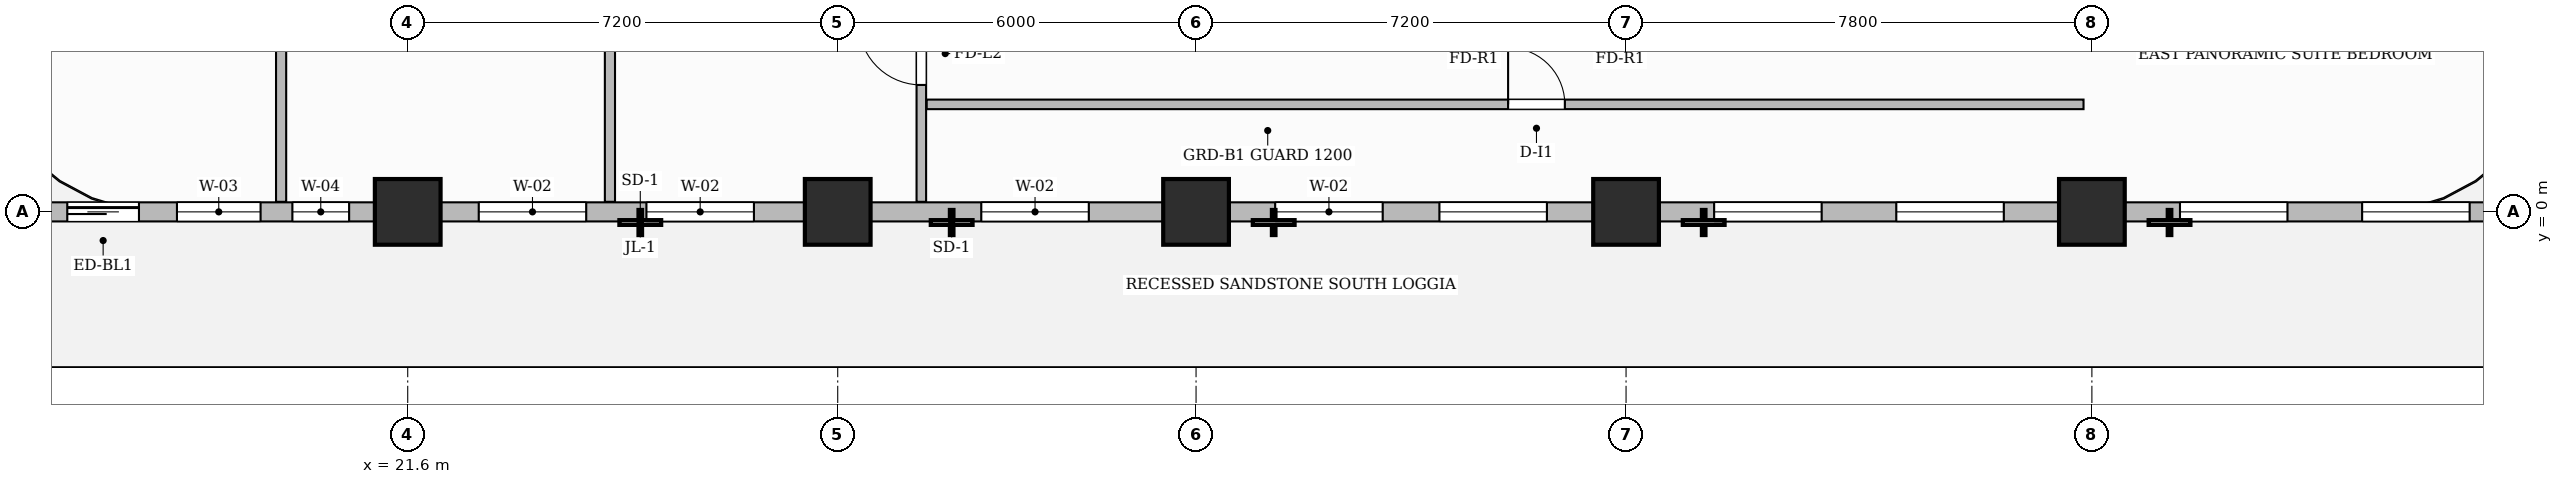
"""IFC4 building model, lengths in metres.
Left out: names, types, materials, properties, quantities, classifications, styles, units other than length and angle.
Written with IfcOpenShell. Run it as: python <this file> out.ifc"""

import sys

from ifc_helpers import new_model, si_unit, direction, frame, frame_2d, origin, origin_2d, place, context, subcontext, project, spatial, rectangle, extrude, source, transform, mapped, element, fill, save


model = new_model("IFC4")
c1 = context("Model", 3, precision=1e-05, world=origin(), true_north=direction((0.0, 1.0)))
c2 = subcontext(c1, "Body", "Model", "MODEL_VIEW")
j1 = project(units=[si_unit("LENGTHUNIT", "METRE"), si_unit("PLANEANGLEUNIT", "RADIAN")], contexts=[c1])
p1 = place(None, origin())
s1 = spatial("IfcSite", under=j1, at=p1, CompositionType="ELEMENT")
p2 = place(p1, origin())
s2 = spatial("IfcBuilding", under=s1, at=p2, CompositionType="ELEMENT")
p3 = place(p2, frame((0.0, 0.0, 32.4)))
s3 = spatial("IfcBuildingStorey", under=s2, at=p3, CompositionType="ELEMENT", Elevation=32.4)
m1 = source(origin(), c2, "Body", "SweptSolid", [
    extrude(rectangle(XDim=1.1, YDim=1.1, at=origin_2d()), origin(), (0.0, 0.0, 1.0), 3.7),
])
for number, where, z_axis, x_axis in (
    (1, (21.6, 0.0, 0.0), (0.0, 0.0, 1.0), (1.0, 0.0, 0.0)),
    (2, (28.8, 0.0, 0.0), (0.0, 0.0, 1.0), (1.0, 0.0, 0.0)),
    (3, (34.8, 0.0, 0.0), (0.0, 0.0, 1.0), (1.0, 0.0, 0.0)),
    (4, (42.0, 0.0, 0.0), (0.0, 0.0, 1.0), (1.0, 0.0, 0.0)),
    (5, (49.8, 0.0, 0.0), (0.0, 0.0, 1.0), (1.0, 0.0, 0.0)),
):
    element("IfcColumn", number, at=place(p3, frame(where, z_axis=z_axis, x_axis=x_axis)), inside=s3, PredefinedType="COLUMN", context=c2, shape_type="MappedRepresentation", body=[
        mapped(m1, transform((0.0, 0.0, 0.0), scale=1.0)),
    ])
p4 = place(p3, frame((30.2, 0.168, 0.0), z_axis=(0.0, 0.0, 1.0), x_axis=(0.0, 1.0, 0.0)))
e6 = element("IfcWall", 6, at=p4, inside=s3, PredefinedType="PARTITIONING", context=c2, shape_type="SweptSolid", body=[
    extrude(rectangle(XDim=8.892, YDim=0.16, at=frame_2d((4.446, 0.0))), origin(), (0.0, 0.0, 1.0), 3.45),
])
p5 = place(p4, frame((1.957, 0.0, 0.0)))
e7 = element("IfcOpeningElement", 7, at=p5, cuts=e6, PredefinedType="OPENING", context=c2, shape_type="SweptSolid", body=[
    extrude(rectangle(XDim=1.05, YDim=2.15, at=frame_2d((0.525, 1.075))), frame((0.0, 0.09, 0.0), z_axis=(0.0, -1.0, 0.0), x_axis=(1.0, 0.0, 0.0)), (0.0, 0.0, 1.0), 0.18),
])
p6 = place(p3, frame((30.29, 1.8, 0.0), z_axis=(0.0, 0.0, 1.0), x_axis=(1.0, 0.0, 0.0)))
e8 = element("IfcWall", 8, at=p6, inside=s3, PredefinedType="PARTITIONING", context=c2, shape_type="SweptSolid", body=[
    extrude(rectangle(XDim=19.37, YDim=0.16, at=frame_2d((9.685, 0.0))), origin(), (0.0, 0.0, 1.0), 3.45),
])
p7 = place(p6, frame((9.735, 0.0, 0.0)))
e9 = element("IfcOpeningElement", 9, at=p7, cuts=e8, PredefinedType="OPENING", context=c2, shape_type="SweptSolid", body=[
    extrude(rectangle(XDim=0.95, YDim=2.15, at=frame_2d((0.475, 1.075))), frame((0.0, 0.09, 0.0), z_axis=(0.0, -1.0, 0.0), x_axis=(1.0, 0.0, 0.0)), (0.0, 0.0, 1.0), 0.18),
])
p8 = place(p3, frame((19.48, 0.168, 0.0), z_axis=(0.0, 0.0, 1.0), x_axis=(0.0, 1.0, 0.0)))
e10 = element("IfcWall", 10, at=p8, inside=s3, PredefinedType="PARTITIONING", context=c2, shape_type="SweptSolid", body=[
    extrude(rectangle(XDim=8.892, YDim=0.17, at=frame_2d((4.446, 0.0))), origin(), (0.0, 0.0, 1.0), 3.45),
])
p9 = place(p3, frame((24.986, 0.168, 0.0), z_axis=(0.0, 0.0, 1.0), x_axis=(0.0, 1.0, 0.0)))
e11 = element("IfcWall", 11, at=p9, inside=s3, PredefinedType="PARTITIONING", context=c2, shape_type="SweptSolid", body=[
    extrude(rectangle(XDim=8.892, YDim=0.17, at=frame_2d((4.446, 0.0))), origin(), (0.0, 0.0, 1.0), 3.035),
])
p10 = place(p3, frame((14.4, 0.0, 0.0), z_axis=(0.0, 0.0, 1.0), x_axis=(1.0, 0.0, 0.0)))
e12 = element("IfcWall", 12, at=p10, inside=s3, PredefinedType="SOLIDWALL", context=c2, shape_type="SweptSolid", body=[
    extrude(rectangle(XDim=43.2, YDim=0.32, at=frame_2d((21.6, 0.0))), origin(), (0.0, 0.0, 1.0), 2.885),
])
p11 = place(p10, frame((1.5, 0.0, 0.0)))
e13 = element("IfcOpeningElement", 13, at=p11, cuts=e12, PredefinedType="OPENING", context=c2, shape_type="SweptSolid", body=[
    extrude(rectangle(XDim=1.2, YDim=2.2, at=frame_2d((0.6, 1.1))), frame((0.0, 0.17, 0.0), z_axis=(0.0, -1.0, 0.0), x_axis=(1.0, 0.0, 0.0)), (0.0, 0.0, 1.0), 0.34),
])
p12 = place(p10, frame((3.336, 0.0, 0.8)))
e14 = element("IfcOpeningElement", 14, at=p12, cuts=e12, PredefinedType="OPENING", context=c2, shape_type="SweptSolid", body=[
    extrude(rectangle(XDim=1.4, YDim=1.85, at=frame_2d((0.7, 0.925))), frame((0.0, 0.17, 0.0), z_axis=(0.0, -1.0, 0.0), x_axis=(1.0, 0.0, 0.0)), (0.0, 0.0, 1.0), 0.34),
])
p13 = place(p10, frame((5.269, 0.0, 0.8)))
e15 = element("IfcOpeningElement", 15, at=p13, cuts=e12, PredefinedType="OPENING", context=c2, shape_type="SweptSolid", body=[
    extrude(rectangle(XDim=0.95, YDim=1.75, at=frame_2d((0.475, 0.875))), frame((0.0, 0.17, 0.0), z_axis=(0.0, -1.0, 0.0), x_axis=(1.0, 0.0, 0.0)), (0.0, 0.0, 1.0), 0.34),
])
p14 = place(p10, frame((8.389, 0.0, 0.8)))
e16 = element("IfcOpeningElement", 16, at=p14, cuts=e12, PredefinedType="OPENING", context=c2, shape_type="SweptSolid", body=[
    extrude(rectangle(XDim=1.8, YDim=1.85, at=frame_2d((0.9, 0.925))), frame((0.0, 0.17, 0.0), z_axis=(0.0, -1.0, 0.0), x_axis=(1.0, 0.0, 0.0)), (0.0, 0.0, 1.0), 0.34),
])
p15 = place(p10, frame((11.197, 0.0, 0.8)))
e17 = element("IfcOpeningElement", 17, at=p15, cuts=e12, PredefinedType="OPENING", context=c2, shape_type="SweptSolid", body=[
    extrude(rectangle(XDim=1.8, YDim=1.85, at=frame_2d((0.9, 0.925))), frame((0.0, 0.17, 0.0), z_axis=(0.0, -1.0, 0.0), x_axis=(1.0, 0.0, 0.0)), (0.0, 0.0, 1.0), 0.34),
])
p16 = place(p10, frame((16.804, 0.0, 0.8)))
e18 = element("IfcOpeningElement", 18, at=p16, cuts=e12, PredefinedType="OPENING", context=c2, shape_type="SweptSolid", body=[
    extrude(rectangle(XDim=1.8, YDim=1.85, at=frame_2d((0.9, 0.925))), frame((0.0, 0.17, 0.0), z_axis=(0.0, -1.0, 0.0), x_axis=(1.0, 0.0, 0.0)), (0.0, 0.0, 1.0), 0.34),
])
p17 = place(p10, frame((21.725, 0.0, 0.8)))
e19 = element("IfcOpeningElement", 19, at=p17, cuts=e12, PredefinedType="OPENING", context=c2, shape_type="SweptSolid", body=[
    extrude(rectangle(XDim=1.8, YDim=1.85, at=frame_2d((0.9, 0.925))), frame((0.0, 0.17, 0.0), z_axis=(0.0, -1.0, 0.0), x_axis=(1.0, 0.0, 0.0)), (0.0, 0.0, 1.0), 0.34),
])
p18 = place(p10, frame((24.475, 0.0, 0.8)))
e20 = element("IfcOpeningElement", 20, at=p18, cuts=e12, PredefinedType="OPENING", context=c2, shape_type="SweptSolid", body=[
    extrude(rectangle(XDim=1.8, YDim=1.85, at=frame_2d((0.9, 0.925))), frame((0.0, 0.17, 0.0), z_axis=(0.0, -1.0, 0.0), x_axis=(1.0, 0.0, 0.0)), (0.0, 0.0, 1.0), 0.34),
])
p19 = place(p10, frame((29.075, 0.0, 0.8)))
e21 = element("IfcOpeningElement", 21, at=p19, cuts=e12, PredefinedType="OPENING", context=c2, shape_type="SweptSolid", body=[
    extrude(rectangle(XDim=1.8, YDim=1.85, at=frame_2d((0.9, 0.925))), frame((0.0, 0.17, 0.0), z_axis=(0.0, -1.0, 0.0), x_axis=(1.0, 0.0, 0.0)), (0.0, 0.0, 1.0), 0.34),
])
p20 = place(p10, frame((32.125, 0.0, 0.8)))
e22 = element("IfcOpeningElement", 22, at=p20, cuts=e12, PredefinedType="OPENING", context=c2, shape_type="SweptSolid", body=[
    extrude(rectangle(XDim=1.8, YDim=1.85, at=frame_2d((0.9, 0.925))), frame((0.0, 0.17, 0.0), z_axis=(0.0, -1.0, 0.0), x_axis=(1.0, 0.0, 0.0)), (0.0, 0.0, 1.0), 0.34),
])
p21 = place(p10, frame((36.875, 0.0, 0.8)))
e23 = element("IfcOpeningElement", 23, at=p21, cuts=e12, PredefinedType="OPENING", context=c2, shape_type="SweptSolid", body=[
    extrude(rectangle(XDim=1.8, YDim=1.85, at=frame_2d((0.9, 0.925))), frame((0.0, 0.17, 0.0), z_axis=(0.0, -1.0, 0.0), x_axis=(1.0, 0.0, 0.0)), (0.0, 0.0, 1.0), 0.34),
])
p22 = place(p10, frame((39.925, 0.0, 0.8)))
e24 = element("IfcOpeningElement", 24, at=p22, cuts=e12, PredefinedType="OPENING", context=c2, shape_type="SweptSolid", body=[
    extrude(rectangle(XDim=1.8, YDim=1.85, at=frame_2d((0.9, 0.925))), frame((0.0, 0.17, 0.0), z_axis=(0.0, -1.0, 0.0), x_axis=(1.0, 0.0, 0.0)), (0.0, 0.0, 1.0), 0.34),
])
m2 = source(origin(), c2, "Body", "SweptSolid", [
    extrude(rectangle(XDim=1.05, YDim=2.15, at=frame_2d((0.525, 1.075))), frame((0.0, 0.025, 0.0), z_axis=(0.0, -1.0, 0.0), x_axis=(1.0, 0.0, 0.0)), (0.0, 0.0, 1.0), 0.05),
])
p23 = place(p5, origin())
e25 = element("IfcDoor", 25, at=p23, inside=s3, OperationType="SINGLE_SWING_RIGHT", PredefinedType="DOOR", context=c2, shape_type="MappedRepresentation", body=[
    mapped(m2, transform((0.0, 0.0, 0.0), scale=1.0)),
])
fill(e7, e25)
m3 = source(origin(), c2, "Body", "SweptSolid", [
    extrude(rectangle(XDim=0.95, YDim=2.15, at=frame_2d((0.475, 1.075))), frame((0.0, 0.025, 0.0), z_axis=(0.0, -1.0, 0.0), x_axis=(1.0, 0.0, 0.0)), (0.0, 0.0, 1.0), 0.05),
])
p24 = place(p7, origin())
e26 = element("IfcDoor", 26, at=p24, inside=s3, OperationType="SINGLE_SWING_LEFT", PredefinedType="DOOR", context=c2, shape_type="MappedRepresentation", body=[
    mapped(m3, transform((0.0, 0.0, 0.0), scale=1.0)),
])
fill(e9, e26)
m4 = source(origin(), c2, "Body", "SweptSolid", [
    extrude(rectangle(XDim=1.2, YDim=2.2, at=frame_2d((0.6, 1.1))), frame((0.0, 0.025, 0.0), z_axis=(0.0, -1.0, 0.0), x_axis=(1.0, 0.0, 0.0)), (0.0, 0.0, 1.0), 0.05),
])
p25 = place(p11, origin())
e27 = element("IfcDoor", 27, at=p25, inside=s3, OperationType="SLIDING_TO_LEFT", PredefinedType="DOOR", context=c2, shape_type="MappedRepresentation", body=[
    mapped(m4, transform((0.0, 0.0, 0.0), scale=1.0)),
])
fill(e13, e27)
m5 = source(origin(), c2, "Body", "SweptSolid", [
    extrude(rectangle(XDim=1.4, YDim=1.85, at=frame_2d((0.7, 0.925))), frame((0.0, 0.03, 0.0), z_axis=(0.0, -1.0, 0.0), x_axis=(1.0, 0.0, 0.0)), (0.0, 0.0, 1.0), 0.06),
])
p26 = place(p12, origin())
e28 = element("IfcWindow", 28, at=p26, inside=s3, PartitioningType="SINGLE_PANEL", PredefinedType="WINDOW", context=c2, shape_type="MappedRepresentation", body=[
    mapped(m5, transform((0.0, 0.0, 0.0), scale=1.0)),
])
fill(e14, e28)
m6 = source(origin(), c2, "Body", "SweptSolid", [
    extrude(rectangle(XDim=0.95, YDim=1.75, at=frame_2d((0.475, 0.875))), frame((0.0, 0.03, 0.0), z_axis=(0.0, -1.0, 0.0), x_axis=(1.0, 0.0, 0.0)), (0.0, 0.0, 1.0), 0.06),
])
p27 = place(p13, origin())
e29 = element("IfcWindow", 29, at=p27, inside=s3, PartitioningType="SINGLE_PANEL", PredefinedType="WINDOW", context=c2, shape_type="MappedRepresentation", body=[
    mapped(m6, transform((0.0, 0.0, 0.0), scale=1.0)),
])
fill(e15, e29)
m7 = source(origin(), c2, "Body", "SweptSolid", [
    extrude(rectangle(XDim=1.8, YDim=1.85, at=frame_2d((0.9, 0.925))), frame((0.0, 0.03, 0.0), z_axis=(0.0, -1.0, 0.0), x_axis=(1.0, 0.0, 0.0)), (0.0, 0.0, 1.0), 0.06),
])
p28 = place(p14, origin())
e30 = element("IfcWindow", 30, at=p28, inside=s3, PartitioningType="DOUBLE_PANEL_VERTICAL", PredefinedType="WINDOW", context=c2, shape_type="MappedRepresentation", body=[
    mapped(m7, transform((0.0, 0.0, 0.0), scale=1.0)),
])
fill(e16, e30)
p29 = place(p15, origin())
e31 = element("IfcWindow", 31, at=p29, inside=s3, PartitioningType="DOUBLE_PANEL_VERTICAL", PredefinedType="WINDOW", context=c2, shape_type="MappedRepresentation", body=[
    mapped(m7, transform((0.0, 0.0, 0.0), scale=1.0)),
])
fill(e17, e31)
p30 = place(p16, origin())
e32 = element("IfcWindow", 32, at=p30, inside=s3, PartitioningType="DOUBLE_PANEL_VERTICAL", PredefinedType="WINDOW", context=c2, shape_type="MappedRepresentation", body=[
    mapped(m7, transform((0.0, 0.0, 0.0), scale=1.0)),
])
fill(e18, e32)
p31 = place(p17, origin())
e33 = element("IfcWindow", 33, at=p31, inside=s3, PartitioningType="DOUBLE_PANEL_VERTICAL", PredefinedType="WINDOW", context=c2, shape_type="MappedRepresentation", body=[
    mapped(m7, transform((0.0, 0.0, 0.0), scale=1.0)),
])
fill(e19, e33)
p32 = place(p18, origin())
e34 = element("IfcWindow", 34, at=p32, inside=s3, PartitioningType="DOUBLE_PANEL_VERTICAL", PredefinedType="WINDOW", context=c2, shape_type="MappedRepresentation", body=[
    mapped(m7, transform((0.0, 0.0, 0.0), scale=1.0)),
])
fill(e20, e34)
p33 = place(p19, origin())
e35 = element("IfcWindow", 35, at=p33, inside=s3, PartitioningType="DOUBLE_PANEL_VERTICAL", PredefinedType="WINDOW", context=c2, shape_type="MappedRepresentation", body=[
    mapped(m7, transform((0.0, 0.0, 0.0), scale=1.0)),
])
fill(e21, e35)
p34 = place(p20, origin())
e36 = element("IfcWindow", 36, at=p34, inside=s3, PartitioningType="DOUBLE_PANEL_VERTICAL", PredefinedType="WINDOW", context=c2, shape_type="MappedRepresentation", body=[
    mapped(m7, transform((0.0, 0.0, 0.0), scale=1.0)),
])
fill(e22, e36)
p35 = place(p21, origin())
e37 = element("IfcWindow", 37, at=p35, inside=s3, PartitioningType="DOUBLE_PANEL_VERTICAL", PredefinedType="WINDOW", context=c2, shape_type="MappedRepresentation", body=[
    mapped(m7, transform((0.0, 0.0, 0.0), scale=1.0)),
])
fill(e23, e37)
p36 = place(p22, origin())
e38 = element("IfcWindow", 38, at=p36, inside=s3, PartitioningType="DOUBLE_PANEL_VERTICAL", PredefinedType="WINDOW", context=c2, shape_type="MappedRepresentation", body=[
    mapped(m7, transform((0.0, 0.0, 0.0), scale=1.0)),
])
fill(e24, e38)
save(model, sys.argv[1])
